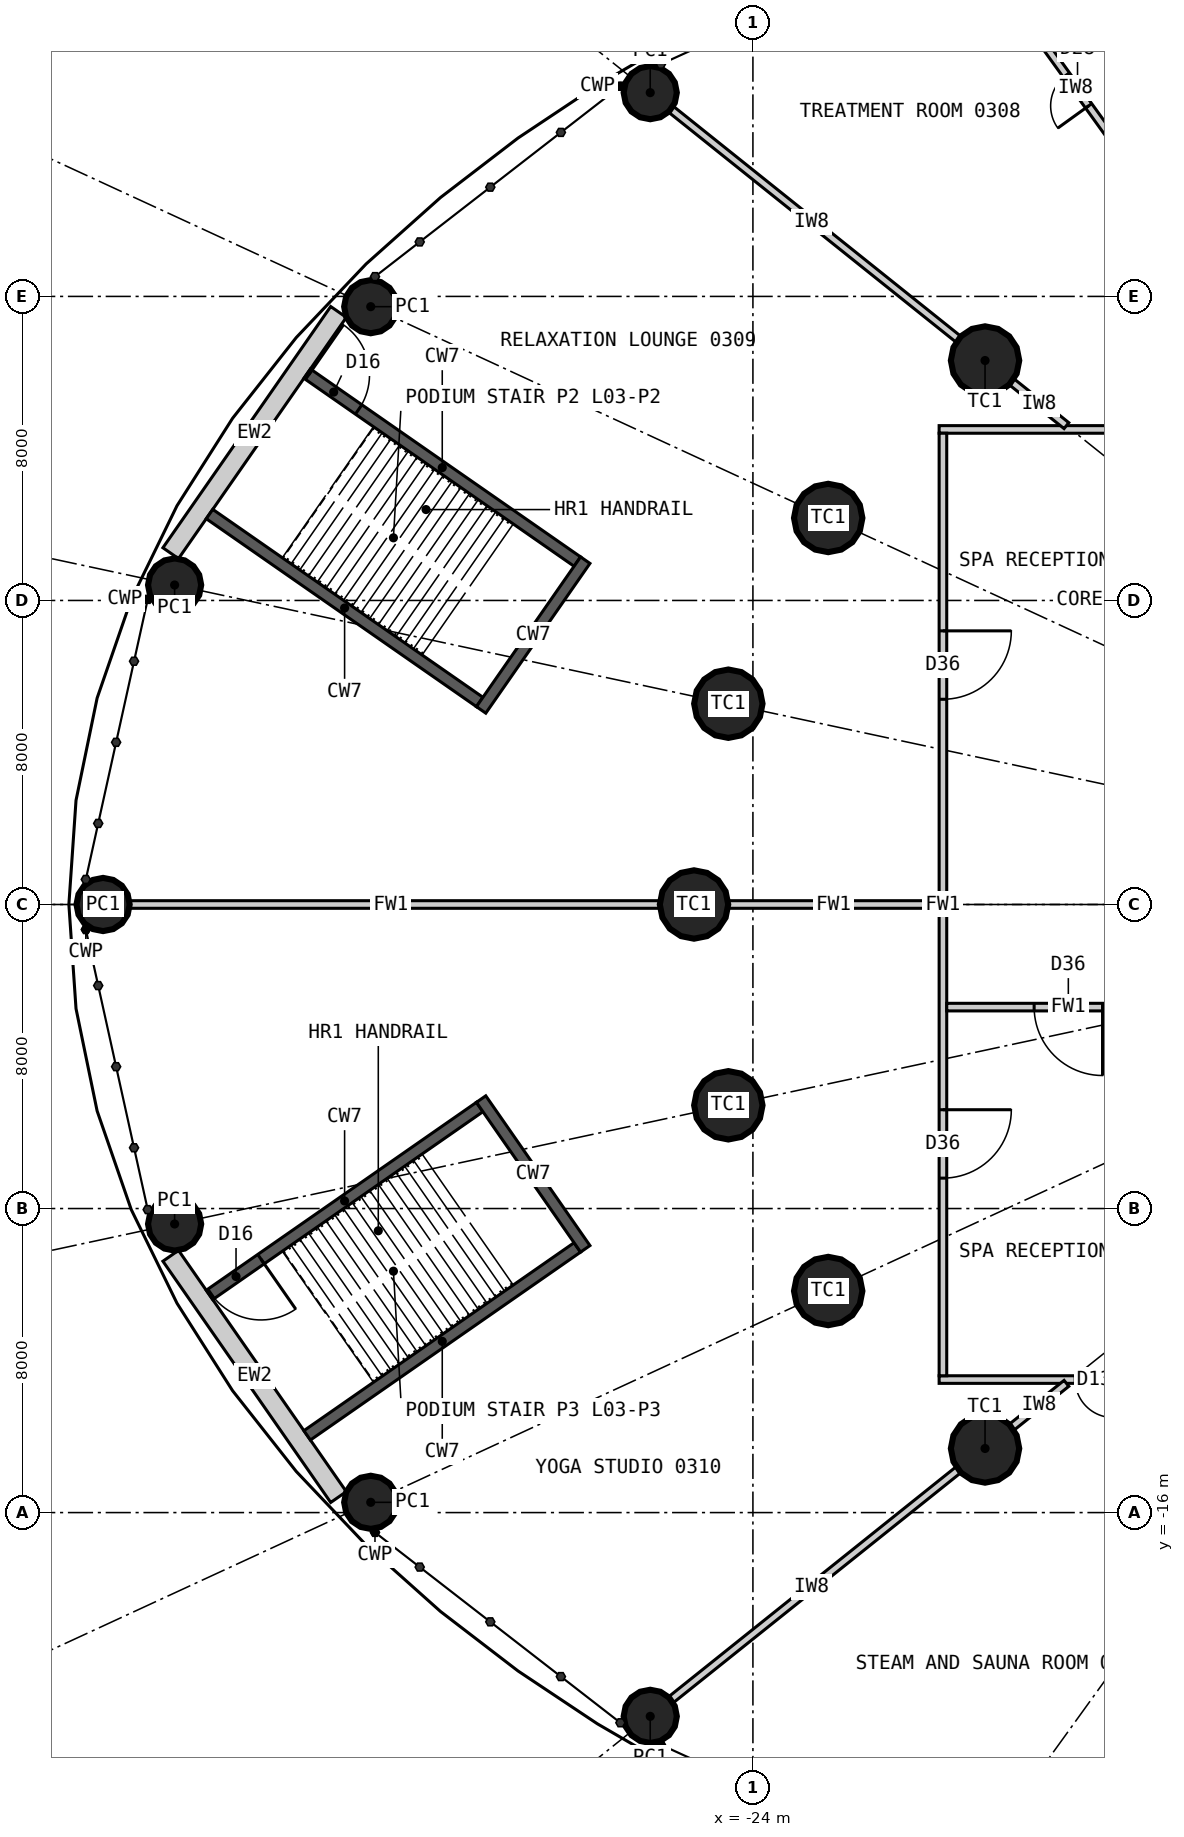
"""IFC4 building model, lengths in metres.
Left out: names, types, materials, properties, quantities, classifications, styles, units other than length and angle.
Written with IfcOpenShell. Run it as: python <this file> out.ifc"""

import sys

from ifc_helpers import new_model, si_unit, direction, frame, frame_2d, origin, origin_2d, place, context, subcontext, project, spatial, rectangle, circle, extrude, element, fill, save


model = new_model("IFC4")
c1 = context("Model", 3, precision=1e-05, world=origin(), true_north=direction((0.0, 1.0)))
c2 = subcontext(c1, "Body", "Model", "MODEL_VIEW")
j1 = project(units=[si_unit("LENGTHUNIT", "METRE"), si_unit("PLANEANGLEUNIT", "RADIAN")], contexts=[c1])
p1 = place(None, origin())
s1 = spatial("IfcSite", under=j1, at=p1, CompositionType="ELEMENT")
p2 = place(p1, origin())
s2 = spatial("IfcBuilding", under=s1, at=p2, CompositionType="ELEMENT")
p3 = place(p2, frame((0.0, 0.0, 19.2)))
s3 = spatial("IfcBuildingStorey", under=s2, at=p3, CompositionType="ELEMENT", Elevation=19.2)
for number, where, z_axis, x_axis in (
    (1, (-17.892, 14.313, 0.0), (0.0, 0.0, 1.0), (1.0, 0.0, 0.0)),
    (2, (-22.019, 10.17, 0.0), (0.0, 0.0, 1.0), (1.0, 0.0, 0.0)),
    (3, (-24.647, 5.283, 0.0), (0.0, 0.0, 1.0), (1.0, 0.0, 0.0)),
    (4, (-25.55, 0.0, 0.0), (0.0, 0.0, 1.0), (1.0, 0.0, 0.0)),
    (5, (-24.647, -5.283, 0.0), (0.0, 0.0, 1.0), (1.0, 0.0, 0.0)),
    (6, (-22.019, -10.17, 0.0), (0.0, 0.0, 1.0), (1.0, 0.0, 0.0)),
    (7, (-17.892, -14.313, 0.0), (0.0, 0.0, 1.0), (1.0, 0.0, 0.0)),
):
    element("IfcColumn", number, at=place(p3, frame(where, z_axis=z_axis, x_axis=x_axis)), inside=s3, PredefinedType="COLUMN", context=c2, shape_type="SweptSolid", body=[
        extrude(circle(Radius=0.9, at=origin_2d()), origin(), (0.0, 0.0, 1.0), 5.4),
    ])
for number, where, z_axis, x_axis in (
    (8, (-26.702, 21.362, 0.0), (0.0, 0.0, 1.0), (1.0, 0.0, 0.0)),
    (9, (-34.057, 15.73, 0.0), (0.0, 0.0, 1.0), (1.0, 0.0, 0.0)),
    (10, (-39.218, 8.407, 0.0), (0.0, 0.0, 1.0), (1.0, 0.0, 0.0)),
    (11, (-41.1, 0.0, 0.0), (0.0, 0.0, 1.0), (1.0, 0.0, 0.0)),
    (12, (-39.218, -8.407, 0.0), (0.0, 0.0, 1.0), (1.0, 0.0, 0.0)),
    (13, (-34.057, -15.73, 0.0), (0.0, 0.0, 1.0), (1.0, 0.0, 0.0)),
    (14, (-26.702, -21.362, 0.0), (0.0, 0.0, 1.0), (1.0, 0.0, 0.0)),
):
    element("IfcColumn", number, at=place(p3, frame(where, z_axis=z_axis, x_axis=x_axis)), inside=s3, PredefinedType="COLUMN", context=c2, shape_type="SweptSolid", body=[
        extrude(circle(Radius=0.7, at=origin_2d()), origin(), (0.0, 0.0, 1.0), 5.4),
    ])
for number, where, z_axis, x_axis in (
    (15, (-34.905, 15.592, 0.0), (0.0, 0.0, 1.0), (-0.571, -0.821, 0.0)),
    (16, (-39.32, -9.244, 0.0), (0.0, 0.0, 1.0), (0.571, -0.821, 0.0)),
):
    element("IfcWall", number, at=place(p3, frame(where, z_axis=z_axis, x_axis=x_axis)), inside=s3, PredefinedType="SOLIDWALL", context=c2, shape_type="SweptSolid", body=[
        extrude(rectangle(XDim=7.733, YDim=0.5, at=frame_2d((3.866, 0.0))), origin(), (0.0, 0.0, 1.0), 5.15),
    ])
p4 = place(p3, frame((-19.1, 12.5, 0.0), z_axis=(0.0, 0.0, 1.0), x_axis=(1.0, 0.0, 0.0)))
e17 = element("IfcWall", 17, at=p4, inside=s3, PredefinedType="PARTITIONING", context=c2, shape_type="SweptSolid", body=[
    extrude(rectangle(XDim=38.2, YDim=0.2, at=frame_2d((19.1, 0.0))), origin(), (0.0, 0.0, 1.0), 5.15),
])
p5 = place(p4, frame((31.022, 0.0, 0.0)))
e18 = element("IfcOpeningElement", 18, at=p5, cuts=e17, PredefinedType="OPENING", context=c2, shape_type="SweptSolid", body=[
    extrude(rectangle(XDim=1.0, YDim=2.2, at=frame_2d((0.5, 1.1))), frame((0.0, 0.11, 0.0), z_axis=(0.0, -1.0, 0.0), x_axis=(1.0, 0.0, 0.0)), (0.0, 0.0, 1.0), 0.22),
])
p6 = place(p4, frame((25.257, 0.0, 0.0)))
e19 = element("IfcOpeningElement", 19, at=p6, cuts=e17, PredefinedType="OPENING", context=c2, shape_type="SweptSolid", body=[
    extrude(rectangle(XDim=1.0, YDim=2.2, at=frame_2d((0.5, 1.1))), frame((0.0, 0.11, 0.0), z_axis=(0.0, -1.0, 0.0), x_axis=(1.0, 0.0, 0.0)), (0.0, 0.0, 1.0), 0.22),
])
p7 = place(p4, frame((20.71, 0.0, 0.0)))
e20 = element("IfcOpeningElement", 20, at=p7, cuts=e17, PredefinedType="OPENING", context=c2, shape_type="SweptSolid", body=[
    extrude(rectangle(XDim=1.0, YDim=2.1, at=frame_2d((0.5, 1.05))), frame((0.0, 0.11, 0.0), z_axis=(0.0, -1.0, 0.0), x_axis=(1.0, 0.0, 0.0)), (0.0, 0.0, 1.0), 0.22),
])
p8 = place(p4, frame((16.49, 0.0, 0.0)))
e21 = element("IfcOpeningElement", 21, at=p8, cuts=e17, PredefinedType="OPENING", context=c2, shape_type="SweptSolid", body=[
    extrude(rectangle(XDim=1.0, YDim=2.1, at=frame_2d((0.5, 1.05))), frame((0.0, 0.11, 0.0), z_axis=(0.0, -1.0, 0.0), x_axis=(1.0, 0.0, 0.0)), (0.0, 0.0, 1.0), 0.22),
])
p9 = place(p4, frame((11.943, 0.0, 0.0)))
e22 = element("IfcOpeningElement", 22, at=p9, cuts=e17, PredefinedType="OPENING", context=c2, shape_type="SweptSolid", body=[
    extrude(rectangle(XDim=1.0, YDim=2.2, at=frame_2d((0.5, 1.1))), frame((0.0, 0.11, 0.0), z_axis=(0.0, -1.0, 0.0), x_axis=(1.0, 0.0, 0.0)), (0.0, 0.0, 1.0), 0.22),
])
p10 = place(p4, frame((6.178, 0.0, 0.0)))
e23 = element("IfcOpeningElement", 23, at=p10, cuts=e17, PredefinedType="OPENING", context=c2, shape_type="SweptSolid", body=[
    extrude(rectangle(XDim=1.0, YDim=2.2, at=frame_2d((0.5, 1.1))), frame((0.0, 0.11, 0.0), z_axis=(0.0, -1.0, 0.0), x_axis=(1.0, 0.0, 0.0)), (0.0, 0.0, 1.0), 0.22),
])
p11 = place(p3, frame((19.1, -12.5, 0.0), z_axis=(0.0, 0.0, 1.0), x_axis=(-1.0, 0.0, 0.0)))
e24 = element("IfcWall", 24, at=p11, inside=s3, PredefinedType="PARTITIONING", context=c2, shape_type="SweptSolid", body=[
    extrude(rectangle(XDim=38.2, YDim=0.2, at=frame_2d((19.1, 0.0))), origin(), (0.0, 0.0, 1.0), 5.15),
])
p12 = place(p11, frame((6.54, 0.0, 0.0)))
e25 = element("IfcOpeningElement", 25, at=p12, cuts=e24, PredefinedType="OPENING", context=c2, shape_type="SweptSolid", body=[
    extrude(rectangle(XDim=1.8, YDim=2.4, at=frame_2d((0.9, 1.2))), frame((0.0, 0.11, 0.0), z_axis=(0.0, -1.0, 0.0), x_axis=(1.0, 0.0, 0.0)), (0.0, 0.0, 1.0), 0.22),
])
p13 = place(p11, frame((27.52, 0.0, 0.0)))
e26 = element("IfcOpeningElement", 26, at=p13, cuts=e24, PredefinedType="OPENING", context=c2, shape_type="SweptSolid", body=[
    extrude(rectangle(XDim=1.0, YDim=2.2, at=frame_2d((0.5, 1.1))), frame((0.0, 0.11, 0.0), z_axis=(0.0, -1.0, 0.0), x_axis=(1.0, 0.0, 0.0)), (0.0, 0.0, 1.0), 0.22),
])
p14 = place(p11, frame((20.71, 0.0, 0.0)))
e27 = element("IfcOpeningElement", 27, at=p14, cuts=e24, PredefinedType="OPENING", context=c2, shape_type="SweptSolid", body=[
    extrude(rectangle(XDim=1.0, YDim=2.2, at=frame_2d((0.5, 1.1))), frame((0.0, 0.11, 0.0), z_axis=(0.0, -1.0, 0.0), x_axis=(1.0, 0.0, 0.0)), (0.0, 0.0, 1.0), 0.22),
])
p15 = place(p11, frame((16.39, 0.0, 0.0)))
e28 = element("IfcOpeningElement", 28, at=p15, cuts=e24, PredefinedType="OPENING", context=c2, shape_type="SweptSolid", body=[
    extrude(rectangle(XDim=1.2, YDim=2.2, at=frame_2d((0.6, 1.1))), frame((0.0, 0.11, 0.0), z_axis=(0.0, -1.0, 0.0), x_axis=(1.0, 0.0, 0.0)), (0.0, 0.0, 1.0), 0.22),
])
p16 = place(p11, frame((33.62, 0.0, 0.0)))
e29 = element("IfcOpeningElement", 29, at=p16, cuts=e24, PredefinedType="OPENING", context=c2, shape_type="SweptSolid", body=[
    extrude(rectangle(XDim=1.0, YDim=2.2, at=frame_2d((0.5, 1.1))), frame((0.0, 0.11, 0.0), z_axis=(0.0, -1.0, 0.0), x_axis=(1.0, 0.0, 0.0)), (0.0, 0.0, 1.0), 0.22),
])
p17 = place(p3, frame((-19.0, 12.4, 0.0), z_axis=(0.0, 0.0, 1.0), x_axis=(0.0, -1.0, 0.0)))
e30 = element("IfcWall", 30, at=p17, inside=s3, PredefinedType="PARTITIONING", context=c2, shape_type="SweptSolid", body=[
    extrude(rectangle(XDim=24.8, YDim=0.2, at=frame_2d((12.4, 0.0))), origin(), (0.0, 0.0, 1.0), 5.15),
])
p18 = place(p17, frame((5.2, 0.0, 0.0)))
e31 = element("IfcOpeningElement", 31, at=p18, cuts=e30, PredefinedType="OPENING", context=c2, shape_type="SweptSolid", body=[
    extrude(rectangle(XDim=1.8, YDim=2.4, at=frame_2d((0.9, 1.2))), frame((0.0, 0.11, 0.0), z_axis=(0.0, -1.0, 0.0), x_axis=(1.0, 0.0, 0.0)), (0.0, 0.0, 1.0), 0.22),
])
p19 = place(p17, frame((17.8, 0.0, 0.0)))
e32 = element("IfcOpeningElement", 32, at=p19, cuts=e30, PredefinedType="OPENING", context=c2, shape_type="SweptSolid", body=[
    extrude(rectangle(XDim=1.8, YDim=2.4, at=frame_2d((0.9, 1.2))), frame((0.0, 0.11, 0.0), z_axis=(0.0, -1.0, 0.0), x_axis=(1.0, 0.0, 0.0)), (0.0, 0.0, 1.0), 0.22),
])
p20 = place(p3, frame((-13.118, 18.176, 0.0), z_axis=(0.0, 0.0, 1.0), x_axis=(-0.585204349301, 0.810885854828, 0.0)))
e33 = element("IfcWall", 33, at=p20, inside=s3, PredefinedType="PARTITIONING", context=c2, shape_type="SweptSolid", body=[
    extrude(rectangle(XDim=8.161, YDim=0.2, at=frame_2d((4.081, 0.0))), origin(), (0.0, 0.0, 1.0), 4.25),
])
p21 = place(p20, frame((3.5, 0.0, 0.0)))
e34 = element("IfcOpeningElement", 34, at=p21, cuts=e33, PredefinedType="OPENING", context=c2, shape_type="SweptSolid", body=[
    extrude(rectangle(XDim=1.0, YDim=2.2, at=frame_2d((0.5, 1.1))), frame((0.0, 0.11, 0.0), z_axis=(0.0, -1.0, 0.0), x_axis=(1.0, 0.0, 0.0)), (0.0, 0.0, 1.0), 0.22),
])
p22 = place(p3, frame((-15.75, 12.6, 0.0), z_axis=(0.0, 0.0, 1.0), x_axis=(-0.780881734892, 0.6246788904, 0.0)))
e35 = element("IfcWall", 35, at=p22, inside=s3, PredefinedType="PARTITIONING", context=c2, shape_type="SweptSolid", body=[
    extrude(rectangle(XDim=1.843, YDim=0.2, at=frame_2d((0.921, 0.0))), origin(), (0.0, 0.0, 1.0), 4.3),
])
p23 = place(p3, frame((-18.594, 14.875, 0.0), z_axis=(0.0, 0.0, 1.0), x_axis=(-0.780868809443, 0.624695047554, 0.0)))
e36 = element("IfcWall", 36, at=p23, inside=s3, PredefinedType="PARTITIONING", context=c2, shape_type="SweptSolid", body=[
    extrude(rectangle(XDim=9.883, YDim=0.2, at=frame_2d((4.941, 0.0))), origin(), (0.0, 0.0, 1.0), 4.25),
])
p24 = place(p3, frame((-19.1, 0.0, 0.0), z_axis=(0.0, 0.0, 1.0), x_axis=(-1.0, 0.0, 0.0)))
e37 = element("IfcWall", 37, at=p24, inside=s3, PredefinedType="PARTITIONING", context=c2, shape_type="SweptSolid", body=[
    extrude(rectangle(XDim=5.55, YDim=0.2, at=frame_2d((2.775, 0.0))), origin(), (0.0, 0.0, 1.0), 4.25),
])
p25 = place(p3, frame((-26.45, 0.0, 0.0), z_axis=(0.0, 0.0, 1.0), x_axis=(-1.0, 0.0, 0.0)))
e38 = element("IfcWall", 38, at=p25, inside=s3, PredefinedType="PARTITIONING", context=c2, shape_type="SweptSolid", body=[
    extrude(rectangle(XDim=14.15, YDim=0.2, at=frame_2d((7.075, 0.0))), origin(), (0.0, 0.0, 1.0), 4.25),
])
p26 = place(p3, frame((-15.75, -12.6, 0.0), z_axis=(0.0, 0.0, 1.0), x_axis=(-0.780881734892, -0.6246788904, 0.0)))
e39 = element("IfcWall", 39, at=p26, inside=s3, PredefinedType="PARTITIONING", context=c2, shape_type="SweptSolid", body=[
    extrude(rectangle(XDim=1.843, YDim=0.2, at=frame_2d((0.921, 0.0))), origin(), (0.0, 0.0, 1.0), 4.3),
])
p27 = place(p3, frame((-18.594, -14.875, 0.0), z_axis=(0.0, 0.0, 1.0), x_axis=(-0.780868809443, -0.624695047554, 0.0)))
e40 = element("IfcWall", 40, at=p27, inside=s3, PredefinedType="PARTITIONING", context=c2, shape_type="SweptSolid", body=[
    extrude(rectangle(XDim=9.883, YDim=0.2, at=frame_2d((4.941, 0.0))), origin(), (0.0, 0.0, 1.0), 4.25),
])
p28 = place(p3, frame((-35.729, 13.968, 0.0), z_axis=(0.0, 0.0, 1.0), x_axis=(0.82092761123, -0.571032273274, 0.0)))
e41 = element("IfcWall", 41, at=p28, inside=s3, PredefinedType="SHEAR", context=c2, shape_type="SweptSolid", body=[
    extrude(rectangle(XDim=8.66, YDim=0.3, at=frame_2d((4.33, 0.0))), origin(), (0.0, 0.0, 1.0), 5.4),
])
p29 = place(p28, frame((0.05, 0.0, 0.0)))
e42 = element("IfcOpeningElement", 42, at=p29, cuts=e41, PredefinedType="OPENING", context=c2, shape_type="SweptSolid", body=[
    extrude(rectangle(XDim=1.6, YDim=2.1, at=frame_2d((0.8, 1.05))), frame((0.0, 0.16, 0.0), z_axis=(0.0, -1.0, 0.0), x_axis=(1.0, 0.0, 0.0)), (0.0, 0.0, 1.0), 0.32),
])
p30 = place(p3, frame((-38.299, 10.274, 0.0), z_axis=(0.0, 0.0, 1.0), x_axis=(0.820936803751, -0.571019057692, 0.0)))
e43 = element("IfcWall", 43, at=p30, inside=s3, PredefinedType="SHEAR", context=c2, shape_type="SweptSolid", body=[
    extrude(rectangle(XDim=8.66, YDim=0.3, at=frame_2d((4.33, 0.0))), origin(), (0.0, 0.0, 1.0), 5.4),
])
p31 = place(p3, frame((-28.412, 9.06, 0.0), z_axis=(0.0, 0.0, 1.0), x_axis=(-0.571036173178, -0.820924898467, 0.0)))
e44 = element("IfcWall", 44, at=p31, inside=s3, PredefinedType="SHEAR", context=c2, shape_type="SweptSolid", body=[
    extrude(rectangle(XDim=4.8, YDim=0.3, at=frame_2d((2.4, 0.0))), origin(), (0.0, 0.0, 1.0), 5.4),
])
p32 = place(p3, frame((-38.299, -10.274, 0.0), z_axis=(0.0, 0.0, 1.0), x_axis=(0.820936803751, 0.571019057692, 0.0)))
e45 = element("IfcWall", 45, at=p32, inside=s3, PredefinedType="SHEAR", context=c2, shape_type="SweptSolid", body=[
    extrude(rectangle(XDim=8.66, YDim=0.3, at=frame_2d((4.33, 0.0))), origin(), (0.0, 0.0, 1.0), 5.4),
])
p33 = place(p32, frame((0.05, 0.0, 0.0)))
e46 = element("IfcOpeningElement", 46, at=p33, cuts=e45, PredefinedType="OPENING", context=c2, shape_type="SweptSolid", body=[
    extrude(rectangle(XDim=1.6, YDim=2.1, at=frame_2d((0.8, 1.05))), frame((0.0, 0.16, 0.0), z_axis=(0.0, -1.0, 0.0), x_axis=(1.0, 0.0, 0.0)), (0.0, 0.0, 1.0), 0.32),
])
p34 = place(p3, frame((-35.729, -13.968, 0.0), z_axis=(0.0, 0.0, 1.0), x_axis=(0.82092761123, 0.571032273274, 0.0)))
e47 = element("IfcWall", 47, at=p34, inside=s3, PredefinedType="SHEAR", context=c2, shape_type="SweptSolid", body=[
    extrude(rectangle(XDim=8.66, YDim=0.3, at=frame_2d((4.33, 0.0))), origin(), (0.0, 0.0, 1.0), 5.4),
])
p35 = place(p3, frame((-31.153, -5.12, 0.0), z_axis=(0.0, 0.0, 1.0), x_axis=(0.571036173178, -0.820924898467, 0.0)))
e48 = element("IfcWall", 48, at=p35, inside=s3, PredefinedType="SHEAR", context=c2, shape_type="SweptSolid", body=[
    extrude(rectangle(XDim=4.8, YDim=0.3, at=frame_2d((2.4, 0.0))), origin(), (0.0, 0.0, 1.0), 5.4),
])
p36 = place(p3, frame((-18.9, -2.7, 0.0), z_axis=(0.0, 0.0, 1.0), x_axis=(1.0, 0.0, 0.0)))
e49 = element("IfcWall", 49, at=p36, inside=s3, PredefinedType="PARTITIONING", context=c2, shape_type="SweptSolid", body=[
    extrude(rectangle(XDim=6.4, YDim=0.2, at=frame_2d((3.2, 0.0))), origin(), (0.0, 0.0, 1.0), 5.15),
])
p37 = place(p36, frame((2.3, 0.0, 0.0)))
e50 = element("IfcOpeningElement", 50, at=p37, cuts=e49, PredefinedType="OPENING", context=c2, shape_type="SweptSolid", body=[
    extrude(rectangle(XDim=1.8, YDim=2.4, at=frame_2d((0.9, 1.2))), frame((0.0, 0.11, 0.0), z_axis=(0.0, -1.0, 0.0), x_axis=(1.0, 0.0, 0.0)), (0.0, 0.0, 1.0), 0.22),
])
p38 = place(p29, origin())
e51 = element("IfcDoor", 51, at=p38, inside=s3, OperationType="SINGLE_SWING_LEFT", PredefinedType="DOOR", context=c2, shape_type="SweptSolid", body=[
    extrude(rectangle(XDim=1.6, YDim=2.1, at=frame_2d((0.8, 1.05))), frame((0.0, 0.025, 0.0), z_axis=(0.0, -1.0, 0.0), x_axis=(1.0, 0.0, 0.0)), (0.0, 0.0, 1.0), 0.05),
])
fill(e42, e51)
p39 = place(p33, origin())
e52 = element("IfcDoor", 52, at=p39, inside=s3, OperationType="SINGLE_SWING_RIGHT", PredefinedType="DOOR", context=c2, shape_type="SweptSolid", body=[
    extrude(rectangle(XDim=1.6, YDim=2.1, at=frame_2d((0.8, 1.05))), frame((0.0, 0.025, 0.0), z_axis=(0.0, -1.0, 0.0), x_axis=(1.0, 0.0, 0.0)), (0.0, 0.0, 1.0), 0.05),
])
fill(e46, e52)
p40 = place(p18, origin())
e53 = element("IfcDoor", 53, at=p40, inside=s3, OperationType="DOUBLE_DOOR_DOUBLE_SWING", PredefinedType="DOOR", context=c2, shape_type="SweptSolid", body=[
    extrude(rectangle(XDim=1.8, YDim=2.4, at=frame_2d((0.9, 1.2))), frame((0.0, 0.025, 0.0), z_axis=(0.0, -1.0, 0.0), x_axis=(1.0, 0.0, 0.0)), (0.0, 0.0, 1.0), 0.05),
])
fill(e31, e53)
p41 = place(p19, origin())
e54 = element("IfcDoor", 54, at=p41, inside=s3, OperationType="DOUBLE_DOOR_DOUBLE_SWING", PredefinedType="DOOR", context=c2, shape_type="SweptSolid", body=[
    extrude(rectangle(XDim=1.8, YDim=2.4, at=frame_2d((0.9, 1.2))), frame((0.0, 0.025, 0.0), z_axis=(0.0, -1.0, 0.0), x_axis=(1.0, 0.0, 0.0)), (0.0, 0.0, 1.0), 0.05),
])
fill(e32, e54)
p42 = place(p37, origin())
e55 = element("IfcDoor", 55, at=p42, inside=s3, OperationType="DOUBLE_DOOR_DOUBLE_SWING", PredefinedType="DOOR", context=c2, shape_type="SweptSolid", body=[
    extrude(rectangle(XDim=1.8, YDim=2.4, at=frame_2d((0.9, 1.2))), frame((0.0, 0.025, 0.0), z_axis=(0.0, -1.0, 0.0), x_axis=(1.0, 0.0, 0.0)), (0.0, 0.0, 1.0), 0.05),
])
fill(e50, e55)
p43 = place(p16, origin())
e56 = element("IfcDoor", 56, at=p43, inside=s3, OperationType="SINGLE_SWING_LEFT", PredefinedType="DOOR", context=c2, shape_type="SweptSolid", body=[
    extrude(rectangle(XDim=1.0, YDim=2.2, at=frame_2d((0.5, 1.1))), frame((0.0, 0.025, 0.0), z_axis=(0.0, -1.0, 0.0), x_axis=(1.0, 0.0, 0.0)), (0.0, 0.0, 1.0), 0.05),
])
fill(e29, e56)
p44 = place(p21, origin())
e57 = element("IfcDoor", 57, at=p44, inside=s3, OperationType="SINGLE_SWING_LEFT", PredefinedType="DOOR", context=c2, shape_type="SweptSolid", body=[
    extrude(rectangle(XDim=1.0, YDim=2.2, at=frame_2d((0.5, 1.1))), frame((0.0, 0.025, 0.0), z_axis=(0.0, -1.0, 0.0), x_axis=(1.0, 0.0, 0.0)), (0.0, 0.0, 1.0), 0.05),
])
fill(e34, e57)
save(model, sys.argv[1])
